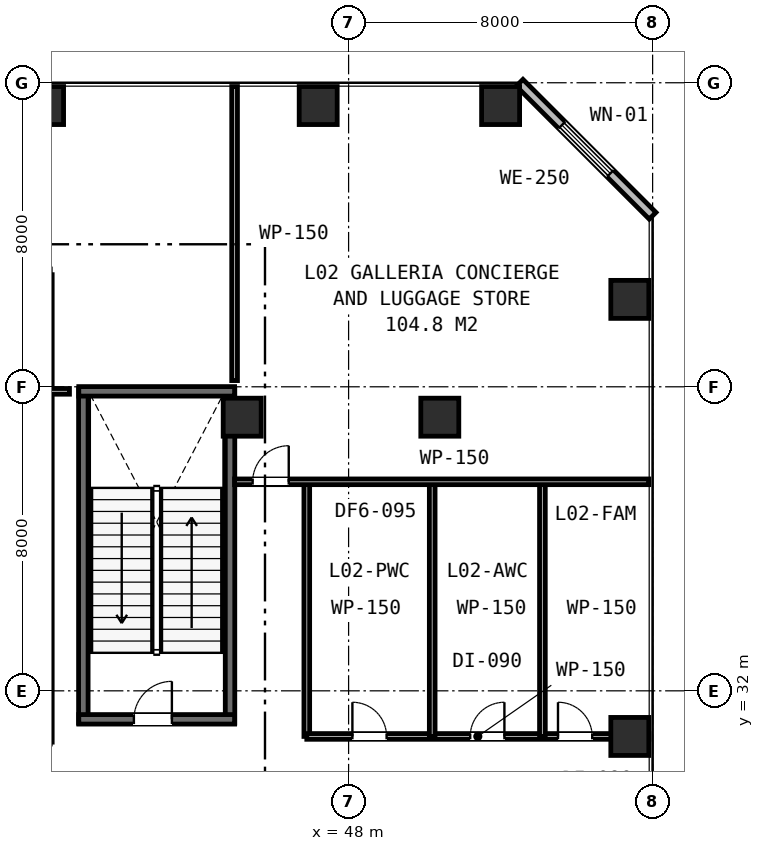
"""IFC4 building model, lengths in metres.
Left out: names, types, materials, properties, quantities, classifications, styles, units other than length and angle.
Written with IfcOpenShell. Run it as: python <this file> out.ifc"""

import sys

from ifc_helpers import new_model, si_unit, direction, frame, frame_2d, origin, origin_2d, place, context, subcontext, project, spatial, rectangle, extrude, element, fill, save


model = new_model("IFC4")
c1 = context("Model", 3, precision=1e-05, world=origin(), true_north=direction((0.0, 1.0)))
c2 = subcontext(c1, "Body", "Model", "MODEL_VIEW")
j1 = project(units=[si_unit("LENGTHUNIT", "METRE"), si_unit("PLANEANGLEUNIT", "RADIAN")], contexts=[c1])
p1 = place(None, origin())
s1 = spatial("IfcSite", under=j1, at=p1, CompositionType="ELEMENT")
p2 = place(p1, origin())
s2 = spatial("IfcBuilding", under=s1, at=p2, CompositionType="ELEMENT")
p3 = place(p2, frame((0.0, 0.0, 11.1)))
s3 = spatial("IfcBuildingStorey", under=s2, at=p3, CompositionType="ELEMENT", Elevation=11.1)
p4 = place(p3, frame((40.0, 30.65, 0.0), z_axis=(0.0, 0.0, 1.0), x_axis=(0.0, 1.0, 0.0)))
e1 = element("IfcWall", 1, at=p4, inside=s3, PredefinedType="SHEAR", context=c2, shape_type="SweptSolid", body=[
    extrude(rectangle(XDim=12.3, YDim=0.4, at=frame_2d((6.15, 0.0))), origin(), (0.0, 0.0, 1.0), 4.8),
])
for number, where, z_axis, x_axis in (
    (2, (41.02, 31.15, 0.0), (0.0, 0.0, 1.0), (0.0, 1.0, 0.0)),
    (3, (44.88, 31.15, 0.0), (0.0, 0.0, 1.0), (0.0, 1.0, 0.0)),
):
    element("IfcWall", number, at=place(p3, frame(where, z_axis=z_axis, x_axis=x_axis)), inside=s3, PredefinedType="SHEAR", context=c2, shape_type="SweptSolid", body=[
        extrude(rectangle(XDim=8.8, YDim=0.25, at=frame_2d((4.4, 0.0))), origin(), (0.0, 0.0, 1.0), 4.8),
    ])
p5 = place(p3, frame((40.9, 39.88, 0.0), z_axis=(0.0, 0.0, 1.0), x_axis=(1.0, 0.0, 0.0)))
e4 = element("IfcWall", 4, at=p5, inside=s3, PredefinedType="SHEAR", context=c2, shape_type="SweptSolid", body=[
    extrude(rectangle(XDim=4.1, YDim=0.25, at=frame_2d((2.05, 0.0))), origin(), (0.0, 0.0, 1.0), 4.8),
])
p6 = place(p3, frame((40.9, 31.25, 0.0), z_axis=(0.0, 0.0, 1.0), x_axis=(1.0, 0.0, 0.0)))
e5 = element("IfcWall", 5, at=p6, inside=s3, PredefinedType="SHEAR", context=c2, shape_type="SweptSolid", body=[
    extrude(rectangle(XDim=4.1, YDim=0.25, at=frame_2d((2.05, 0.0))), origin(), (0.0, 0.0, 1.0), 4.8),
])
p7 = place(p6, frame((1.45, 0.0, 0.0)))
e6 = element("IfcOpeningElement", 6, at=p7, cuts=e5, PredefinedType="OPENING", context=c2, shape_type="SweptSolid", body=[
    extrude(rectangle(XDim=1.0, YDim=2.15, at=frame_2d((0.5, 1.075))), frame((0.0, 0.135, 0.0), z_axis=(0.0, -1.0, 0.0), x_axis=(1.0, 0.0, 0.0)), (0.0, 0.0, 1.0), 0.27),
])
for number, where, z_axis, x_axis in (
    (7, (45.2, 39.2, 0.0), (0.0, 0.0, 1.0), (1.0, 0.0, 0.0)),
    (8, (40.0, 47.4, 0.0), (0.0, 0.0, 1.0), (1.0, 0.0, 0.0)),
    (9, (47.2, 47.4, 0.0), (0.0, 0.0, 1.0), (1.0, 0.0, 0.0)),
    (10, (50.4, 39.2, 0.0), (0.0, 0.0, 1.0), (1.0, 0.0, 0.0)),
    (11, (55.4, 30.8, 0.0), (0.0, 0.0, 1.0), (1.0, 0.0, 0.0)),
    (12, (55.4, 42.3, 0.0), (0.0, 0.0, 1.0), (1.0, 0.0, 0.0)),
    (13, (52.0, 47.4, 0.0), (0.0, 0.0, 1.0), (1.0, 0.0, 0.0)),
):
    element("IfcColumn", number, at=place(p3, frame(where, z_axis=z_axis, x_axis=x_axis)), inside=s3, PredefinedType="COLUMN", context=c2, shape_type="SweptSolid", body=[
        extrude(rectangle(XDim=1.0, YDim=1.0, at=origin_2d()), origin(), (0.0, 0.0, 1.0), 4.8),
    ])
p8 = place(p3, frame((56.0, 44.5, 0.0), z_axis=(0.0, 0.0, 1.0), x_axis=(-0.707106781187, 0.707106781187, 0.0)))
e14 = element("IfcWall", 14, at=p8, inside=s3, PredefinedType="STANDARD", context=c2, shape_type="SweptSolid", body=[
    extrude(rectangle(XDim=4.95, YDim=0.25, at=frame_2d((2.475, 0.0))), origin(), (0.0, 0.0, 1.0), 4.47),
])
p9 = place(p8, frame((1.575, 0.0, 0.75)))
e15 = element("IfcOpeningElement", 15, at=p9, cuts=e14, PredefinedType="OPENING", context=c2, shape_type="SweptSolid", body=[
    extrude(rectangle(XDim=1.8, YDim=1.85, at=frame_2d((0.9, 0.925))), frame((0.0, 0.135, 0.0), z_axis=(0.0, -1.0, 0.0), x_axis=(1.0, 0.0, 0.0)), (0.0, 0.0, 1.0), 0.27),
])
p10 = place(p3, frame((46.9, 30.8, 0.0), z_axis=(0.0, 0.0, 1.0), x_axis=(0.0, 1.0, 0.0)))
e16 = element("IfcWall", 16, at=p10, inside=s3, PredefinedType="PARTITIONING", context=c2, shape_type="SweptSolid", body=[
    extrude(rectangle(XDim=6.7, YDim=0.15, at=frame_2d((3.35, 0.0))), origin(), (0.0, 0.0, 1.0), 3.82),
])
p11 = place(p3, frame((46.9, 30.8, 0.0), z_axis=(0.0, 0.0, 1.0), x_axis=(1.0, 0.0, 0.0)))
e17 = element("IfcWall", 17, at=p11, inside=s3, PredefinedType="PARTITIONING", context=c2, shape_type="SweptSolid", body=[
    extrude(rectangle(XDim=9.0, YDim=0.15, at=frame_2d((4.5, 0.0))), origin(), (0.0, 0.0, 1.0), 3.82),
])
p12 = place(p11, frame((1.2, 0.0, 0.0)))
e18 = element("IfcOpeningElement", 18, at=p12, cuts=e17, PredefinedType="OPENING", context=c2, shape_type="SweptSolid", body=[
    extrude(rectangle(XDim=0.9, YDim=2.15, at=frame_2d((0.45, 1.075))), frame((0.0, 0.085, 0.0), z_axis=(0.0, -1.0, 0.0), x_axis=(1.0, 0.0, 0.0)), (0.0, 0.0, 1.0), 0.17),
])
p13 = place(p11, frame((4.3, 0.0, 0.0)))
e19 = element("IfcOpeningElement", 19, at=p13, cuts=e17, PredefinedType="OPENING", context=c2, shape_type="SweptSolid", body=[
    extrude(rectangle(XDim=0.9, YDim=2.15, at=frame_2d((0.45, 1.075))), frame((0.0, 0.085, 0.0), z_axis=(0.0, -1.0, 0.0), x_axis=(1.0, 0.0, 0.0)), (0.0, 0.0, 1.0), 0.17),
])
p14 = place(p11, frame((6.61, 0.0, 0.0)))
e20 = element("IfcOpeningElement", 20, at=p14, cuts=e17, PredefinedType="OPENING", context=c2, shape_type="SweptSolid", body=[
    extrude(rectangle(XDim=0.9, YDim=2.15, at=frame_2d((0.45, 1.075))), frame((0.0, 0.085, 0.0), z_axis=(0.0, -1.0, 0.0), x_axis=(1.0, 0.0, 0.0)), (0.0, 0.0, 1.0), 0.17),
])
for number, where, z_axis, x_axis in (
    (21, (50.2, 30.8, 0.0), (0.0, 0.0, 1.0), (0.0, 1.0, 0.0)),
    (22, (53.1, 30.8, 0.0), (0.0, 0.0, 1.0), (0.0, 1.0, 0.0)),
):
    element("IfcWall", number, at=place(p3, frame(where, z_axis=z_axis, x_axis=x_axis)), inside=s3, PredefinedType="PARTITIONING", context=c2, shape_type="SweptSolid", body=[
        extrude(rectangle(XDim=6.7, YDim=0.15, at=frame_2d((3.35, 0.0))), origin(), (0.0, 0.0, 1.0), 3.82),
    ])
p15 = place(p3, frame((45.0, 37.5, 0.0), z_axis=(0.0, 0.0, 1.0), x_axis=(1.0, 0.0, 0.0)))
e23 = element("IfcWall", 23, at=p15, inside=s3, PredefinedType="PARTITIONING", context=c2, shape_type="SweptSolid", body=[
    extrude(rectangle(XDim=10.9, YDim=0.15, at=frame_2d((5.45, 0.0))), origin(), (0.0, 0.0, 1.0), 3.82),
])
p16 = place(p15, frame((0.475, 0.0, 0.0)))
e24 = element("IfcOpeningElement", 24, at=p16, cuts=e23, PredefinedType="OPENING", context=c2, shape_type="SweptSolid", body=[
    extrude(rectangle(XDim=0.95, YDim=2.15, at=frame_2d((0.475, 1.075))), frame((0.0, 0.085, 0.0), z_axis=(0.0, -1.0, 0.0), x_axis=(1.0, 0.0, 0.0)), (0.0, 0.0, 1.0), 0.17),
])
p17 = place(p3, frame((45.0, 40.163, 0.0), z_axis=(0.0, 0.0, 1.0), x_axis=(0.0, 1.0, 0.0)))
e25 = element("IfcWall", 25, at=p17, inside=s3, PredefinedType="PARTITIONING", context=c2, shape_type="SweptSolid", body=[
    extrude(rectangle(XDim=7.737, YDim=0.15, at=frame_2d((3.868, 0.0))), origin(), (0.0, 0.0, 1.0), 4.01),
])
p18 = place(p3, frame((40.0, 39.88, 0.0), z_axis=(0.0, 0.0, 1.0), x_axis=(1.0, 0.0, 0.0)))
e26 = element("IfcWall", 26, at=p18, inside=s3, PredefinedType="PARTITIONING", context=c2, shape_type="SweptSolid", body=[
    extrude(rectangle(XDim=0.655, YDim=0.15, at=frame_2d((0.328, 0.0))), origin(), (0.0, 0.0, 1.0), 4.47),
])
p19 = place(p9, origin())
e27 = element("IfcWindow", 27, at=p19, inside=s3, PartitioningType="SINGLE_PANEL", PredefinedType="WINDOW", context=c2, shape_type="SweptSolid", body=[
    extrude(rectangle(XDim=1.8, YDim=1.85, at=frame_2d((0.9, 0.925))), frame((0.0, 0.03, 0.0), z_axis=(0.0, -1.0, 0.0), x_axis=(1.0, 0.0, 0.0)), (0.0, 0.0, 1.0), 0.06),
])
fill(e15, e27)
p20 = place(p7, origin())
e28 = element("IfcDoor", 28, at=p20, inside=s3, OperationType="SINGLE_SWING_RIGHT", PredefinedType="DOOR", context=c2, shape_type="SweptSolid", body=[
    extrude(rectangle(XDim=1.0, YDim=2.15, at=frame_2d((0.5, 1.075))), frame((0.0, 0.025, 0.0), z_axis=(0.0, -1.0, 0.0), x_axis=(1.0, 0.0, 0.0)), (0.0, 0.0, 1.0), 0.05),
])
fill(e6, e28)
p21 = place(p12, origin())
e29 = element("IfcDoor", 29, at=p21, inside=s3, OperationType="SINGLE_SWING_LEFT", PredefinedType="DOOR", context=c2, shape_type="SweptSolid", body=[
    extrude(rectangle(XDim=0.9, YDim=2.15, at=frame_2d((0.45, 1.075))), frame((0.0, 0.025, 0.0), z_axis=(0.0, -1.0, 0.0), x_axis=(1.0, 0.0, 0.0)), (0.0, 0.0, 1.0), 0.05),
])
fill(e18, e29)
p22 = place(p13, origin())
e30 = element("IfcDoor", 30, at=p22, inside=s3, OperationType="SINGLE_SWING_RIGHT", PredefinedType="DOOR", context=c2, shape_type="SweptSolid", body=[
    extrude(rectangle(XDim=0.9, YDim=2.15, at=frame_2d((0.45, 1.075))), frame((0.0, 0.025, 0.0), z_axis=(0.0, -1.0, 0.0), x_axis=(1.0, 0.0, 0.0)), (0.0, 0.0, 1.0), 0.05),
])
fill(e19, e30)
p23 = place(p14, origin())
e31 = element("IfcDoor", 31, at=p23, inside=s3, OperationType="SINGLE_SWING_LEFT", PredefinedType="DOOR", context=c2, shape_type="SweptSolid", body=[
    extrude(rectangle(XDim=0.9, YDim=2.15, at=frame_2d((0.45, 1.075))), frame((0.0, 0.025, 0.0), z_axis=(0.0, -1.0, 0.0), x_axis=(1.0, 0.0, 0.0)), (0.0, 0.0, 1.0), 0.05),
])
fill(e20, e31)
p24 = place(p16, origin())
e32 = element("IfcDoor", 32, at=p24, inside=s3, OperationType="SINGLE_SWING_RIGHT", PredefinedType="DOOR", context=c2, shape_type="SweptSolid", body=[
    extrude(rectangle(XDim=0.95, YDim=2.15, at=frame_2d((0.475, 1.075))), frame((0.0, 0.025, 0.0), z_axis=(0.0, -1.0, 0.0), x_axis=(1.0, 0.0, 0.0)), (0.0, 0.0, 1.0), 0.05),
])
fill(e24, e32)
save(model, sys.argv[1])
